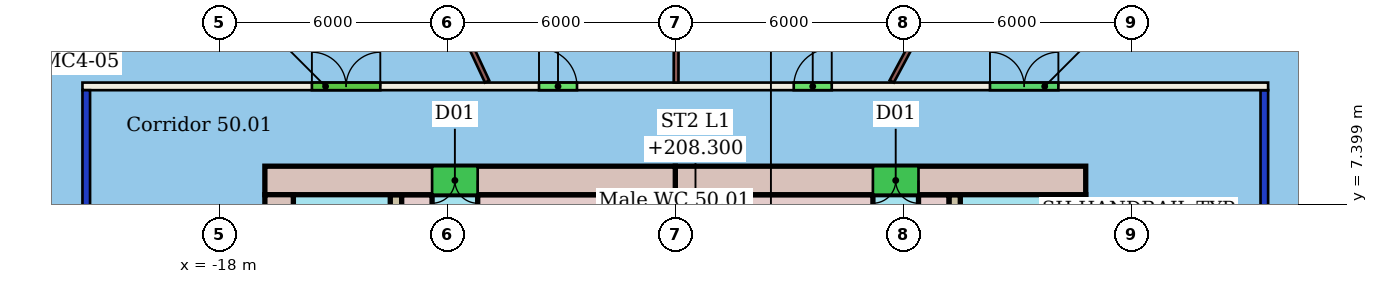
"""IFC4 building model, lengths in metres.
Left out: names, types, materials, properties, quantities, classifications, styles, units other than length and angle.
Written with IfcOpenShell. Run it as: python <this file> out.ifc"""

import sys

from ifc_helpers import new_model, si_unit, direction, frame, frame_2d, origin, place, context, subcontext, project, spatial, rectangle, extrude, element, fill, save


model = new_model("IFC4")
c1 = context("Model", 3, precision=1e-05, world=origin(), true_north=direction((0.0, 1.0)))
c2 = subcontext(c1, "Body", "Model", "MODEL_VIEW")
j1 = project(units=[si_unit("LENGTHUNIT", "METRE"), si_unit("PLANEANGLEUNIT", "RADIAN")], contexts=[c1])
p1 = place(None, origin())
s1 = spatial("IfcSite", under=j1, at=p1, CompositionType="ELEMENT")
p2 = place(p1, origin())
s2 = spatial("IfcBuilding", under=s1, at=p2, CompositionType="ELEMENT")
p3 = place(p2, frame((0.0, 0.0, 206.5)))
s3 = spatial("IfcBuildingStorey", under=s2, at=p3, CompositionType="ELEMENT", Elevation=206.5)
p4 = place(p3, frame((-21.5, -10.4, 0.0), z_axis=(0.0, 0.0, 1.0), x_axis=(0.0, 1.0, 0.0)))
e1 = element("IfcWall", 1, at=p4, inside=s3, PredefinedType="PARTITIONING", context=c2, shape_type="SweptSolid", body=[
    extrude(rectangle(XDim=20.8, YDim=0.2, at=frame_2d((10.4, 0.0))), origin(), (0.0, 0.0, 1.0), 3.05),
])
p5 = place(p4, frame((6.461, 0.0, 0.0)))
e2 = element("IfcOpeningElement", 2, at=p5, cuts=e1, PredefinedType="OPENING", context=c2, shape_type="SweptSolid", body=[
    extrude(rectangle(XDim=1.8, YDim=2.1, at=frame_2d((0.9, 1.05))), frame((0.0, 0.11, 0.0), z_axis=(0.0, -1.0, 0.0), x_axis=(1.0, 0.0, 0.0)), (0.0, 0.0, 1.0), 0.22),
])
p6 = place(p3, frame((-21.6, 10.5, 0.0), z_axis=(0.0, 0.0, 1.0), x_axis=(1.0, 0.0, 0.0)))
e3 = element("IfcWall", 3, at=p6, inside=s3, PredefinedType="PARTITIONING", context=c2, shape_type="SweptSolid", body=[
    extrude(rectangle(XDim=31.2, YDim=0.2, at=frame_2d((15.6, 0.0))), origin(), (0.0, 0.0, 1.0), 3.45),
])
p7 = place(p6, frame((18.717, 0.0, 0.0)))
e4 = element("IfcOpeningElement", 4, at=p7, cuts=e3, PredefinedType="OPENING", context=c2, shape_type="SweptSolid", body=[
    extrude(rectangle(XDim=1.0, YDim=2.4, at=frame_2d((0.5, 1.2))), frame((0.0, 0.11, 0.0), z_axis=(0.0, -1.0, 0.0), x_axis=(1.0, 0.0, 0.0)), (0.0, 0.0, 1.0), 0.22),
])
p8 = place(p6, frame((12.014, 0.0, 0.0)))
e5 = element("IfcOpeningElement", 5, at=p8, cuts=e3, PredefinedType="OPENING", context=c2, shape_type="SweptSolid", body=[
    extrude(rectangle(XDim=1.0, YDim=2.4, at=frame_2d((0.5, 1.2))), frame((0.0, 0.11, 0.0), z_axis=(0.0, -1.0, 0.0), x_axis=(1.0, 0.0, 0.0)), (0.0, 0.0, 1.0), 0.22),
])
p9 = place(p6, frame((6.037, 0.0, 0.0)))
e6 = element("IfcOpeningElement", 6, at=p9, cuts=e3, PredefinedType="OPENING", context=c2, shape_type="SweptSolid", body=[
    extrude(rectangle(XDim=1.8, YDim=2.4, at=frame_2d((0.9, 1.2))), frame((0.0, 0.11, 0.0), z_axis=(0.0, -1.0, 0.0), x_axis=(1.0, 0.0, 0.0)), (0.0, 0.0, 1.0), 0.22),
])
p10 = place(p6, frame((23.88, 0.0, 0.0)))
e7 = element("IfcOpeningElement", 7, at=p10, cuts=e3, PredefinedType="OPENING", context=c2, shape_type="SweptSolid", body=[
    extrude(rectangle(XDim=1.8, YDim=2.1, at=frame_2d((0.9, 1.05))), frame((0.0, 0.11, 0.0), z_axis=(0.0, -1.0, 0.0), x_axis=(1.0, 0.0, 0.0)), (0.0, 0.0, 1.0), 0.22),
])
p11 = place(p3, frame((9.5, 10.4, 0.0), z_axis=(0.0, 0.0, 1.0), x_axis=(0.0, -1.0, 0.0)))
e8 = element("IfcWall", 8, at=p11, inside=s3, PredefinedType="PARTITIONING", context=c2, shape_type="SweptSolid", body=[
    extrude(rectangle(XDim=20.8, YDim=0.2, at=frame_2d((10.4, 0.0))), origin(), (0.0, 0.0, 1.0), 3.05),
])
p12 = place(p11, frame((8.246, 0.0, 0.0)))
e9 = element("IfcOpeningElement", 9, at=p12, cuts=e8, PredefinedType="OPENING", context=c2, shape_type="SweptSolid", body=[
    extrude(rectangle(XDim=1.5, YDim=2.1, at=frame_2d((0.75, 1.05))), frame((0.0, 0.11, 0.0), z_axis=(0.0, -1.0, 0.0), x_axis=(1.0, 0.0, 0.0)), (0.0, 0.0, 1.0), 0.22),
])
p13 = place(p3, frame((6.445, 23.228, 0.0), z_axis=(0.0, 0.0, 1.0), x_axis=(-0.472254118232, -0.881462448328, 0.0)))
e10 = element("IfcWall", 10, at=p13, inside=s3, PredefinedType="PARTITIONING", context=c2, shape_type="SweptSolid", body=[
    extrude(rectangle(XDim=14.293, YDim=0.125, at=frame_2d((7.146, 0.0))), origin(), (0.0, 0.0, 1.0), 3.45),
])
p14 = place(p3, frame((-5.953, 24.023, 0.0), z_axis=(0.0, 0.0, 1.0), x_axis=(-0.001946158555, -0.999998106232, 0.0)))
e11 = element("IfcWall", 11, at=p14, inside=s3, PredefinedType="PARTITIONING", context=c2, shape_type="SweptSolid", body=[
    extrude(rectangle(XDim=13.423, YDim=0.125, at=frame_2d((6.711, 0.0))), origin(), (0.0, 0.0, 1.0), 3.45),
])
p15 = place(p3, frame((-15.473, 20.33, 0.0), z_axis=(0.0, 0.0, 1.0), x_axis=(0.422368542202, -0.906424191291, 0.0)))
e12 = element("IfcWall", 12, at=p15, inside=s3, PredefinedType="PARTITIONING", context=c2, shape_type="SweptSolid", body=[
    extrude(rectangle(XDim=10.706, YDim=0.125, at=frame_2d((5.353, 0.0))), origin(), (0.0, 0.0, 1.0), 3.45),
])
p16 = place(p3, frame((18.599, 8.013, 0.0), z_axis=(0.0, 0.0, 1.0), x_axis=(-0.950829834715, -0.30971377983, 0.0)))
e13 = element("IfcWall", 13, at=p16, inside=s3, PredefinedType="PARTITIONING", context=c2, shape_type="SweptSolid", body=[
    extrude(rectangle(XDim=9.444, YDim=0.125, at=frame_2d((4.722, 0.0))), origin(), (0.0, 0.0, 1.0), 3.45),
])
p17 = place(p3, frame((4.8, 8.025, 0.0), z_axis=(0.0, 0.0, 1.0), x_axis=(-1.0, 0.0, 0.0)))
e14 = element("IfcWall", 14, at=p17, inside=s3, PredefinedType="SHEAR", context=c2, shape_type="SweptSolid", body=[
    extrude(rectangle(XDim=10.8, YDim=0.75, at=frame_2d((5.4, 0.0))), origin(), (0.0, 0.0, 1.0), 3.3),
])
p18 = place(p17, frame((4.4, 0.0, 0.0)))
e15 = element("IfcOpeningElement", 15, at=p18, cuts=e14, PredefinedType="OPENING", context=c2, shape_type="SweptSolid", body=[
    extrude(rectangle(XDim=1.2, YDim=2.1, at=frame_2d((0.6, 1.05))), frame((0.0, 0.385, 0.0), z_axis=(0.0, -1.0, 0.0), x_axis=(1.0, 0.0, 0.0)), (0.0, 0.0, 1.0), 0.77),
])
p19 = place(p3, frame((-6.0, 8.025, 0.0), z_axis=(0.0, 0.0, 1.0), x_axis=(-1.0, 0.0, 0.0)))
e16 = element("IfcWall", 16, at=p19, inside=s3, PredefinedType="SHEAR", context=c2, shape_type="SweptSolid", body=[
    extrude(rectangle(XDim=10.8, YDim=0.75, at=frame_2d((5.4, 0.0))), origin(), (0.0, 0.0, 1.0), 3.3),
])
p20 = place(p19, frame((5.2, 0.0, 0.0)))
e17 = element("IfcOpeningElement", 17, at=p20, cuts=e16, PredefinedType="OPENING", context=c2, shape_type="SweptSolid", body=[
    extrude(rectangle(XDim=1.2, YDim=2.1, at=frame_2d((0.6, 1.05))), frame((0.0, 0.385, 0.0), z_axis=(0.0, -1.0, 0.0), x_axis=(1.0, 0.0, 0.0)), (0.0, 0.0, 1.0), 0.77),
])
p21 = place(p3, frame((-16.425, 7.65, 0.0), z_axis=(0.0, 0.0, 1.0), x_axis=(0.0, -1.0, 0.0)))
e18 = element("IfcWall", 18, at=p21, inside=s3, PredefinedType="SHEAR", context=c2, shape_type="SweptSolid", body=[
    extrude(rectangle(XDim=15.3, YDim=0.75, at=frame_2d((7.65, 0.0))), origin(), (0.0, 0.0, 1.0), 3.3),
])
p22 = place(p21, frame((11.25, 0.0, 0.0)))
e19 = element("IfcOpeningElement", 19, at=p22, cuts=e18, PredefinedType="OPENING", context=c2, shape_type="SweptSolid", body=[
    extrude(rectangle(XDim=1.2, YDim=2.1, at=frame_2d((0.6, 1.05))), frame((0.0, 0.385, 0.0), z_axis=(0.0, -1.0, 0.0), x_axis=(1.0, 0.0, 0.0)), (0.0, 0.0, 1.0), 0.77),
])
p23 = place(p21, frame((2.85, 0.0, 0.0)))
e20 = element("IfcOpeningElement", 20, at=p23, cuts=e18, PredefinedType="OPENING", context=c2, shape_type="SweptSolid", body=[
    extrude(rectangle(XDim=1.2, YDim=2.1, at=frame_2d((0.6, 1.05))), frame((0.0, 0.385, 0.0), z_axis=(0.0, -1.0, 0.0), x_axis=(1.0, 0.0, 0.0)), (0.0, 0.0, 1.0), 0.77),
])
p24 = place(p3, frame((4.425, -7.65, 0.0), z_axis=(0.0, 0.0, 1.0), x_axis=(0.0, 1.0, 0.0)))
e21 = element("IfcWall", 21, at=p24, inside=s3, PredefinedType="SHEAR", context=c2, shape_type="SweptSolid", body=[
    extrude(rectangle(XDim=15.3, YDim=0.75, at=frame_2d((7.65, 0.0))), origin(), (0.0, 0.0, 1.0), 3.3),
])
p25 = place(p24, frame((2.85, 0.0, 0.0)))
e22 = element("IfcOpeningElement", 22, at=p25, cuts=e21, PredefinedType="OPENING", context=c2, shape_type="SweptSolid", body=[
    extrude(rectangle(XDim=1.2, YDim=2.1, at=frame_2d((0.6, 1.05))), frame((0.0, 0.385, 0.0), z_axis=(0.0, -1.0, 0.0), x_axis=(1.0, 0.0, 0.0)), (0.0, 0.0, 1.0), 0.77),
])
p26 = place(p24, frame((11.25, 0.0, 0.0)))
e23 = element("IfcOpeningElement", 23, at=p26, cuts=e21, PredefinedType="OPENING", context=c2, shape_type="SweptSolid", body=[
    extrude(rectangle(XDim=1.2, YDim=2.1, at=frame_2d((0.6, 1.05))), frame((0.0, 0.385, 0.0), z_axis=(0.0, -1.0, 0.0), x_axis=(1.0, 0.0, 0.0)), (0.0, 0.0, 1.0), 0.77),
])
p27 = place(p3, frame((-13.35, 7.65, 0.0), z_axis=(0.0, 0.0, 1.0), x_axis=(0.0, -1.0, 0.0)))
e24 = element("IfcWall", 24, at=p27, inside=s3, PredefinedType="SHEAR", context=c2, shape_type="SweptSolid", body=[
    extrude(rectangle(XDim=15.3, YDim=0.3, at=frame_2d((7.65, 0.0))), origin(), (0.0, 0.0, 1.0), 3.3),
])
p28 = place(p27, frame((6.9, 0.0, 0.0)))
e25 = element("IfcOpeningElement", 25, at=p28, cuts=e24, PredefinedType="OPENING", context=c2, shape_type="SweptSolid", body=[
    extrude(rectangle(XDim=1.5, YDim=2.1, at=frame_2d((0.75, 1.05))), frame((0.0, 0.16, 0.0), z_axis=(0.0, -1.0, 0.0), x_axis=(1.0, 0.0, 0.0)), (0.0, 0.0, 1.0), 0.32),
])
p29 = place(p3, frame((1.35, -7.65, 0.0), z_axis=(0.0, 0.0, 1.0), x_axis=(0.0, 1.0, 0.0)))
e26 = element("IfcWall", 26, at=p29, inside=s3, PredefinedType="SHEAR", context=c2, shape_type="SweptSolid", body=[
    extrude(rectangle(XDim=15.3, YDim=0.3, at=frame_2d((7.65, 0.0))), origin(), (0.0, 0.0, 1.0), 3.3),
])
p30 = place(p29, frame((1.56, 0.0, 0.0)))
e27 = element("IfcOpeningElement", 27, at=p30, cuts=e26, PredefinedType="OPENING", context=c2, shape_type="SweptSolid", body=[
    extrude(rectangle(XDim=1.0, YDim=2.1, at=frame_2d((0.5, 1.05))), frame((0.0, 0.16, 0.0), z_axis=(0.0, -1.0, 0.0), x_axis=(1.0, 0.0, 0.0)), (0.0, 0.0, 1.0), 0.32),
])
p31 = place(p29, frame((6.9, 0.0, 0.0)))
e28 = element("IfcOpeningElement", 28, at=p31, cuts=e26, PredefinedType="OPENING", context=c2, shape_type="SweptSolid", body=[
    extrude(rectangle(XDim=1.5, YDim=2.1, at=frame_2d((0.75, 1.05))), frame((0.0, 0.16, 0.0), z_axis=(0.0, -1.0, 0.0), x_axis=(1.0, 0.0, 0.0)), (0.0, 0.0, 1.0), 0.32),
])
p32 = place(p3, frame((-6.0, 3.88, 0.0), z_axis=(0.0, 0.0, 1.0), x_axis=(0.0, 1.0, 0.0)))
e29 = element("IfcWall", 29, at=p32, inside=s3, PredefinedType="SHEAR", context=c2, shape_type="SweptSolid", body=[
    extrude(rectangle(XDim=3.77, YDim=0.3, at=frame_2d((1.885, 0.0))), origin(), (0.0, 0.0, 1.0), 3.3),
])
p33 = place(p3, frame((-13.2, 7.475, 0.0), z_axis=(0.0, 0.0, 1.0), x_axis=(1.0, 0.0, 0.0)))
e30 = element("IfcWall", 30, at=p33, inside=s3, PredefinedType="SHEAR", context=c2, shape_type="SweptSolid", body=[
    extrude(rectangle(XDim=0.8, YDim=0.35, at=frame_2d((0.4, 0.0))), origin(), (0.0, 0.0, 1.0), 3.3),
])
for number, where, z_axis, x_axis in (
    (31, (-11.2, 7.475, 0.0), (0.0, 0.0, 1.0), (1.0, 0.0, 0.0)),
    (32, (-5.85, 7.475, 0.0), (0.0, 0.0, 1.0), (1.0, 0.0, 0.0)),
):
    element("IfcWall", number, at=place(p3, frame(where, z_axis=z_axis, x_axis=x_axis)), inside=s3, PredefinedType="SHEAR", context=c2, shape_type="SweptSolid", body=[
        extrude(rectangle(XDim=5.05, YDim=0.35, at=frame_2d((2.525, 0.0))), origin(), (0.0, 0.0, 1.0), 3.3),
    ])
p34 = place(p3, frame((0.4, 7.475, 0.0), z_axis=(0.0, 0.0, 1.0), x_axis=(1.0, 0.0, 0.0)))
e33 = element("IfcWall", 33, at=p34, inside=s3, PredefinedType="SHEAR", context=c2, shape_type="SweptSolid", body=[
    extrude(rectangle(XDim=0.8, YDim=0.35, at=frame_2d((0.4, 0.0))), origin(), (0.0, 0.0, 1.0), 3.3),
])
p35 = place(p7, origin())
e34 = element("IfcDoor", 34, at=p35, inside=s3, OperationType="SINGLE_SWING_RIGHT", PredefinedType="DOOR", context=c2, shape_type="SweptSolid", body=[
    extrude(rectangle(XDim=1.0, YDim=2.4, at=frame_2d((0.5, 1.2))), frame((0.0, 0.025, 0.0), z_axis=(0.0, -1.0, 0.0), x_axis=(1.0, 0.0, 0.0)), (0.0, 0.0, 1.0), 0.05),
])
fill(e4, e34)
p36 = place(p8, origin())
e35 = element("IfcDoor", 35, at=p36, inside=s3, OperationType="SINGLE_SWING_LEFT", PredefinedType="DOOR", context=c2, shape_type="SweptSolid", body=[
    extrude(rectangle(XDim=1.0, YDim=2.4, at=frame_2d((0.5, 1.2))), frame((0.0, 0.025, 0.0), z_axis=(0.0, -1.0, 0.0), x_axis=(1.0, 0.0, 0.0)), (0.0, 0.0, 1.0), 0.05),
])
fill(e5, e35)
p37 = place(p9, origin())
e36 = element("IfcDoor", 36, at=p37, inside=s3, OperationType="DOUBLE_DOOR_SINGLE_SWING", PredefinedType="DOOR", context=c2, shape_type="SweptSolid", body=[
    extrude(rectangle(XDim=1.8, YDim=2.4, at=frame_2d((0.9, 1.2))), frame((0.0, 0.025, 0.0), z_axis=(0.0, -1.0, 0.0), x_axis=(1.0, 0.0, 0.0)), (0.0, 0.0, 1.0), 0.05),
])
fill(e6, e36)
p38 = place(p10, origin())
e37 = element("IfcDoor", 37, at=p38, inside=s3, OperationType="DOUBLE_DOOR_SINGLE_SWING", PredefinedType="DOOR", context=c2, shape_type="SweptSolid", body=[
    extrude(rectangle(XDim=1.8, YDim=2.1, at=frame_2d((0.9, 1.05))), frame((0.0, 0.025, 0.0), z_axis=(0.0, -1.0, 0.0), x_axis=(1.0, 0.0, 0.0)), (0.0, 0.0, 1.0), 0.05),
])
fill(e7, e37)
p39 = place(p18, origin())
e38 = element("IfcDoor", 38, at=p39, inside=s3, OperationType="DOUBLE_DOOR_SINGLE_SWING", PredefinedType="NOTDEFINED", context=c2, shape_type="SweptSolid", body=[
    extrude(rectangle(XDim=1.2, YDim=2.1, at=frame_2d((0.6, 1.05))), frame((0.0, 0.025, 0.0), z_axis=(0.0, -1.0, 0.0), x_axis=(1.0, 0.0, 0.0)), (0.0, 0.0, 1.0), 0.05),
])
fill(e15, e38)
p40 = place(p20, origin())
e39 = element("IfcDoor", 39, at=p40, inside=s3, OperationType="DOUBLE_DOOR_SINGLE_SWING", PredefinedType="NOTDEFINED", context=c2, shape_type="SweptSolid", body=[
    extrude(rectangle(XDim=1.2, YDim=2.1, at=frame_2d((0.6, 1.05))), frame((0.0, 0.025, 0.0), z_axis=(0.0, -1.0, 0.0), x_axis=(1.0, 0.0, 0.0)), (0.0, 0.0, 1.0), 0.05),
])
fill(e17, e39)
save(model, sys.argv[1])
